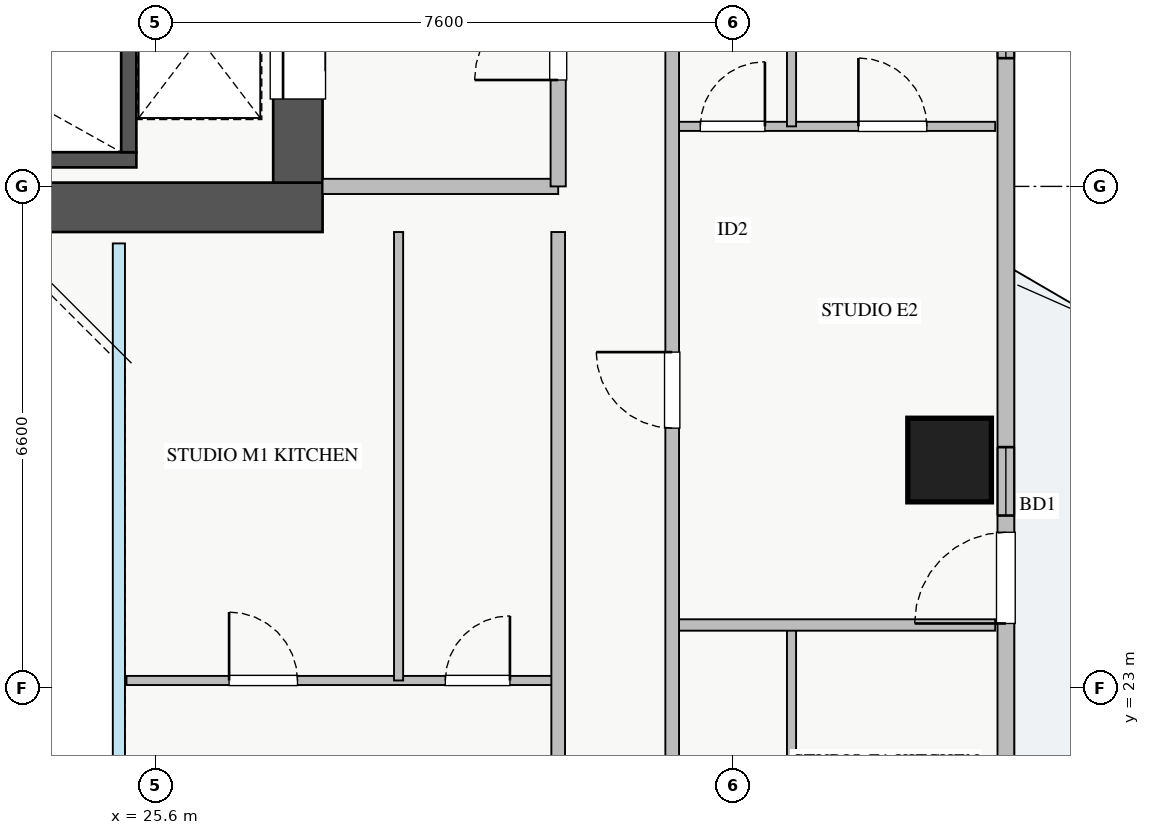
"""IFC4 building model, lengths in metres.
Left out: names, types, materials, properties, quantities, classifications, styles, units other than length and angle.
Written with IfcOpenShell. Run it as: python <this file> out.ifc"""

import sys

from ifc_helpers import new_model, si_unit, direction, frame, frame_2d, origin, origin_2d, place, context, subcontext, project, spatial, rectangle, extrude, source, transform, mapped, element, fill, save


model = new_model("IFC4")
c1 = context("Model", 3, precision=1e-05, world=origin(), true_north=direction((0.0, 1.0)))
c2 = subcontext(c1, "Body", "Model", "MODEL_VIEW")
j1 = project(units=[si_unit("LENGTHUNIT", "METRE"), si_unit("PLANEANGLEUNIT", "RADIAN")], contexts=[c1])
p1 = place(None, origin())
s1 = spatial("IfcSite", under=j1, at=p1, CompositionType="ELEMENT")
p2 = place(p1, origin())
s2 = spatial("IfcBuilding", under=s1, at=p2, CompositionType="ELEMENT")
p3 = place(p2, frame((0.0, 0.0, 132.75)))
s3 = spatial("IfcBuildingStorey", under=s2, at=p3, CompositionType="ELEMENT", Elevation=132.75)
p4 = place(p3, frame((18.2, 29.95, 0.0), z_axis=(0.0, 0.0, 1.0), x_axis=(1.0, 0.0, 0.0)))
e1 = element("IfcWall", 1, at=p4, inside=s3, PredefinedType="SHEAR", context=c2, shape_type="SweptSolid", body=[
    extrude(rectangle(XDim=7.15, YDim=0.2, at=frame_2d((3.575, 0.0))), origin(), (0.0, 0.0, 1.0), 3.25),
])
p5 = place(p3, frame((25.25, 30.05, 0.0), z_axis=(0.0, 0.0, 1.0), x_axis=(0.0, 1.0, 0.0)))
e2 = element("IfcWall", 2, at=p5, inside=s3, PredefinedType="SHEAR", context=c2, shape_type="SweptSolid", body=[
    extrude(rectangle(XDim=2.94, YDim=0.2, at=frame_2d((1.47, 0.0))), origin(), (0.0, 0.0, 1.0), 3.25),
])
p6 = place(p3, frame((10.2, 29.325, 0.0), z_axis=(0.0, 0.0, 1.0), x_axis=(1.0, 0.0, 0.0)))
e3 = element("IfcWall", 3, at=p6, inside=s3, PredefinedType="SHEAR", context=c2, shape_type="SweptSolid", body=[
    extrude(rectangle(XDim=17.6, YDim=0.65, at=frame_2d((8.8, 0.0))), origin(), (0.0, 0.0, 1.0), 3.25),
])
p7 = place(p3, frame((27.475, 29.65, 0.0), z_axis=(0.0, 0.0, 1.0), x_axis=(0.0, 1.0, 0.0)))
e4 = element("IfcWall", 4, at=p7, inside=s3, PredefinedType="SHEAR", context=c2, shape_type="SweptSolid", body=[
    extrude(rectangle(XDim=5.9, YDim=0.65, at=frame_2d((2.95, 0.0))), origin(), (0.0, 0.0, 1.0), 3.25),
])
p8 = place(p7, frame((1.1, 0.0, 0.0)))
e5 = element("IfcOpeningElement", 5, at=p8, cuts=e4, PredefinedType="OPENING", context=c2, shape_type="SweptSolid", body=[
    extrude(rectangle(XDim=1.3, YDim=2.05, at=frame_2d((0.65, 1.025))), frame((0.0, 0.335, 0.0), z_axis=(0.0, -1.0, 0.0), x_axis=(1.0, 0.0, 0.0)), (0.0, 0.0, 1.0), 0.67),
])
m1 = source(origin(), c2, "Body", "SweptSolid", [
    extrude(rectangle(XDim=1.1, YDim=1.1, at=origin_2d()), origin(), (0.0, 0.0, 1.0), 3.25),
])
p9 = place(p3, frame((36.05, 26.0, 0.0), z_axis=(0.0, 0.0, 1.0), x_axis=(1.0, 0.0, 0.0)))
e6 = element("IfcColumn", 6, at=p9, inside=s3, PredefinedType="COLUMN", context=c2, shape_type="MappedRepresentation", body=[
    mapped(m1, transform((0.0, 0.0, 0.0), x_axis=(1.0, 0.0, 0.0), y_axis=(0.0, 1.0, 0.0), z_axis=(0.0, 0.0, 1.0), scale=1.0)),
])
p10 = place(p3, frame((36.79, 10.55, 0.0), z_axis=(0.0, 0.0, 1.0), x_axis=(0.0, 1.0, 0.0)))
e7 = element("IfcWall", 7, at=p10, inside=s3, PredefinedType="STANDARD", context=c2, shape_type="SweptSolid", body=[
    extrude(rectangle(XDim=24.9, YDim=0.22, at=frame_2d((12.45, 0.0))), origin(), (0.0, 0.0, 1.0), 2.61),
])
p11 = place(p10, frame((13.3, 0.0, 0.0)))
e8 = element("IfcOpeningElement", 8, at=p11, cuts=e7, PredefinedType="OPENING", context=c2, shape_type="SweptSolid", body=[
    extrude(rectangle(XDim=1.2, YDim=2.1, at=frame_2d((0.6, 1.05))), frame((0.0, 0.12, 0.0), z_axis=(0.0, -1.0, 0.0), x_axis=(1.0, 0.0, 0.0)), (0.0, 0.0, 1.0), 0.24),
])
p12 = place(p10, frame((1.912, 0.0, 0.9)))
e9 = element("IfcOpeningElement", 9, at=p12, cuts=e7, PredefinedType="OPENING", context=c2, shape_type="SweptSolid", body=[
    extrude(rectangle(XDim=2.4, YDim=1.48, at=frame_2d((1.2, 0.74))), frame((0.0, 0.12, 0.0), z_axis=(0.0, -1.0, 0.0), x_axis=(1.0, 0.0, 0.0)), (0.0, 0.0, 1.0), 0.24),
])
p13 = place(p10, frame((20.737, 0.0, 0.9)))
e10 = element("IfcOpeningElement", 10, at=p13, cuts=e7, PredefinedType="OPENING", context=c2, shape_type="SweptSolid", body=[
    extrude(rectangle(XDim=2.1, YDim=1.48, at=frame_2d((1.05, 0.74))), frame((0.0, 0.12, 0.0), z_axis=(0.0, -1.0, 0.0), x_axis=(1.0, 0.0, 0.0)), (0.0, 0.0, 1.0), 0.24),
])
p14 = place(p10, frame((14.72, 0.0, 0.9)))
e11 = element("IfcOpeningElement", 11, at=p14, cuts=e7, PredefinedType="OPENING", context=c2, shape_type="SweptSolid", body=[
    extrude(rectangle(XDim=0.9, YDim=1.2, at=frame_2d((0.45, 0.6))), frame((0.0, 0.12, 0.0), z_axis=(0.0, -1.0, 0.0), x_axis=(1.0, 0.0, 0.0)), (0.0, 0.0, 1.0), 0.24),
])
p15 = place(p3, frame((27.8, 29.6, 0.0), z_axis=(0.0, 0.0, 1.0), x_axis=(1.0, 0.0, 0.0)))
e12 = element("IfcWall", 12, at=p15, inside=s3, PredefinedType="PARTITIONING", context=c2, shape_type="SweptSolid", body=[
    extrude(rectangle(XDim=3.1, YDim=0.2, at=frame_2d((1.55, 0.0))), origin(), (0.0, 0.0, 1.0), 3.07),
])
p16 = place(p3, frame((30.9, 29.6, 0.0), z_axis=(0.0, 0.0, 1.0), x_axis=(0.0, 1.0, 0.0)))
e13 = element("IfcWall", 13, at=p16, inside=s3, PredefinedType="PARTITIONING", context=c2, shape_type="SweptSolid", body=[
    extrude(rectangle(XDim=3.9, YDim=0.2, at=frame_2d((1.95, 0.0))), origin(), (0.0, 0.0, 1.0), 3.07),
])
p17 = place(p16, frame((1.4, 0.0, 0.0)))
e14 = element("IfcOpeningElement", 14, at=p17, cuts=e13, PredefinedType="OPENING", context=c2, shape_type="SweptSolid", body=[
    extrude(rectangle(XDim=1.1, YDim=2.05, at=frame_2d((0.55, 1.025))), frame((0.0, 0.11, 0.0), z_axis=(0.0, -1.0, 0.0), x_axis=(1.0, 0.0, 0.0)), (0.0, 0.0, 1.0), 0.22),
])
p18 = place(p3, frame((33.97, 17.48, 0.0), z_axis=(0.0, 0.0, 1.0), x_axis=(0.0, 1.0, 0.0)))
e15 = element("IfcWall", 15, at=p18, inside=s3, PredefinedType="PLUMBINGWALL", context=c2, shape_type="SweptSolid", body=[
    extrude(rectangle(XDim=6.35, YDim=0.12, at=frame_2d((3.175, 0.0))), origin(), (0.0, 0.0, 1.0), 3.07),
])
p19 = place(p3, frame((32.4, 30.39, 0.0), z_axis=(0.0, 0.0, 1.0), x_axis=(1.0, 0.0, 0.0)))
e16 = element("IfcWall", 16, at=p19, inside=s3, PredefinedType="PLUMBINGWALL", context=c2, shape_type="SweptSolid", body=[
    extrude(rectangle(XDim=4.25, YDim=0.12, at=frame_2d((2.125, 0.0))), origin(), (0.0, 0.0, 1.0), 3.07),
])
p20 = place(p19, frame((0.37, 0.0, 0.0)))
e17 = element("IfcOpeningElement", 17, at=p20, cuts=e16, PredefinedType="OPENING", context=c2, shape_type="SweptSolid", body=[
    extrude(rectangle(XDim=0.85, YDim=2.05, at=frame_2d((0.425, 1.025))), frame((0.0, 0.07, 0.0), z_axis=(0.0, -1.0, 0.0), x_axis=(1.0, 0.0, 0.0)), (0.0, 0.0, 1.0), 0.14),
])
p21 = place(p19, frame((2.45, 0.0, 0.0)))
e18 = element("IfcOpeningElement", 18, at=p21, cuts=e16, PredefinedType="OPENING", context=c2, shape_type="SweptSolid", body=[
    extrude(rectangle(XDim=0.9, YDim=2.05, at=frame_2d((0.45, 1.025))), frame((0.0, 0.07, 0.0), z_axis=(0.0, -1.0, 0.0), x_axis=(1.0, 0.0, 0.0)), (0.0, 0.0, 1.0), 0.14),
])
p22 = place(p3, frame((33.97, 30.39, 0.0), z_axis=(0.0, 0.0, 1.0), x_axis=(0.0, 1.0, 0.0)))
e19 = element("IfcWall", 19, at=p22, inside=s3, PredefinedType="PLUMBINGWALL", context=c2, shape_type="SweptSolid", body=[
    extrude(rectangle(XDim=5.59, YDim=0.12, at=frame_2d((2.795, 0.0))), origin(), (0.0, 0.0, 1.0), 3.07),
])
p23 = place(p3, frame((32.4, 23.83, 0.0), z_axis=(0.0, 0.0, 1.0), x_axis=(1.0, 0.0, 0.0)))
e20 = element("IfcWall", 20, at=p23, inside=s3, PredefinedType="PARTITIONING", context=c2, shape_type="SweptSolid", body=[
    extrude(rectangle(XDim=4.25, YDim=0.15, at=frame_2d((2.125, 0.0))), origin(), (0.0, 0.0, 1.0), 3.07),
])
p24 = place(p3, frame((32.4, 8.31, 0.0), z_axis=(0.0, 0.0, 1.0), x_axis=(0.0, 1.0, 0.0)))
e21 = element("IfcWall", 21, at=p24, inside=s3, PredefinedType="PARTITIONING", context=c2, shape_type="SweptSolid", body=[
    extrude(rectangle(XDim=29.13, YDim=0.18, at=frame_2d((14.565, 0.0))), origin(), (0.0, 0.0, 1.0), 3.07),
])
p25 = place(p24, frame((27.94, 0.0, 0.0)))
e22 = element("IfcOpeningElement", 22, at=p25, cuts=e21, PredefinedType="OPENING", context=c2, shape_type="SweptSolid", body=[
    extrude(rectangle(XDim=0.9, YDim=2.05, at=frame_2d((0.45, 1.025))), frame((0.0, 0.1, 0.0), z_axis=(0.0, -1.0, 0.0), x_axis=(1.0, 0.0, 0.0)), (0.0, 0.0, 1.0), 0.2),
])
p26 = place(p24, frame((0.415, 0.0, 0.0)))
e23 = element("IfcOpeningElement", 23, at=p26, cuts=e21, PredefinedType="OPENING", context=c2, shape_type="SweptSolid", body=[
    extrude(rectangle(XDim=0.9, YDim=2.05, at=frame_2d((0.45, 1.025))), frame((0.0, 0.1, 0.0), z_axis=(0.0, -1.0, 0.0), x_axis=(1.0, 0.0, 0.0)), (0.0, 0.0, 1.0), 0.2),
])
p27 = place(p24, frame((4.75, 0.0, 0.0)))
e24 = element("IfcOpeningElement", 24, at=p27, cuts=e21, PredefinedType="OPENING", context=c2, shape_type="SweptSolid", body=[
    extrude(rectangle(XDim=1.0, YDim=2.05, at=frame_2d((0.5, 1.025))), frame((0.0, 0.1, 0.0), z_axis=(0.0, -1.0, 0.0), x_axis=(1.0, 0.0, 0.0)), (0.0, 0.0, 1.0), 0.2),
])
p28 = place(p24, frame((18.11, 0.0, 0.0)))
e25 = element("IfcOpeningElement", 25, at=p28, cuts=e21, PredefinedType="OPENING", context=c2, shape_type="SweptSolid", body=[
    extrude(rectangle(XDim=1.0, YDim=2.05, at=frame_2d((0.5, 1.025))), frame((0.0, 0.1, 0.0), z_axis=(0.0, -1.0, 0.0), x_axis=(1.0, 0.0, 0.0)), (0.0, 0.0, 1.0), 0.2),
])
p29 = place(p3, frame((25.22, 23.1, 0.0), z_axis=(0.0, 0.0, 1.0), x_axis=(1.0, 0.0, 0.0)))
e26 = element("IfcWall", 26, at=p29, inside=s3, PredefinedType="PLUMBINGWALL", context=c2, shape_type="SweptSolid", body=[
    extrude(rectangle(XDim=5.68, YDim=0.12, at=frame_2d((2.84, 0.0))), origin(), (0.0, 0.0, 1.0), 3.07),
])
p30 = place(p29, frame((1.35, 0.0, 0.0)))
e27 = element("IfcOpeningElement", 27, at=p30, cuts=e26, PredefinedType="OPENING", context=c2, shape_type="SweptSolid", body=[
    extrude(rectangle(XDim=0.9, YDim=2.05, at=frame_2d((0.45, 1.025))), frame((0.0, 0.07, 0.0), z_axis=(0.0, -1.0, 0.0), x_axis=(1.0, 0.0, 0.0)), (0.0, 0.0, 1.0), 0.14),
])
p31 = place(p29, frame((4.195, 0.0, 0.0)))
e28 = element("IfcOpeningElement", 28, at=p31, cuts=e26, PredefinedType="OPENING", context=c2, shape_type="SweptSolid", body=[
    extrude(rectangle(XDim=0.85, YDim=2.05, at=frame_2d((0.425, 1.025))), frame((0.0, 0.07, 0.0), z_axis=(0.0, -1.0, 0.0), x_axis=(1.0, 0.0, 0.0)), (0.0, 0.0, 1.0), 0.14),
])
p32 = place(p3, frame((28.8, 23.1, 0.0), z_axis=(0.0, 0.0, 1.0), x_axis=(0.0, 1.0, 0.0)))
e29 = element("IfcWall", 29, at=p32, inside=s3, PredefinedType="PLUMBINGWALL", context=c2, shape_type="SweptSolid", body=[
    extrude(rectangle(XDim=5.9, YDim=0.12, at=frame_2d((2.95, 0.0))), origin(), (0.0, 0.0, 1.0), 3.07),
])
p33 = place(p3, frame((30.9, 17.0, 0.0), z_axis=(0.0, 0.0, 1.0), x_axis=(0.0, 1.0, 0.0)))
e30 = element("IfcWall", 30, at=p33, inside=s3, PredefinedType="PARTITIONING", context=c2, shape_type="SweptSolid", body=[
    extrude(rectangle(XDim=12.0, YDim=0.18, at=frame_2d((6.0, 0.0))), origin(), (0.0, 0.0, 1.0), 3.07),
])
p34 = place(p33, frame((2.36, 0.0, 0.0)))
e31 = element("IfcOpeningElement", 31, at=p34, cuts=e30, PredefinedType="OPENING", context=c2, shape_type="SweptSolid", body=[
    extrude(rectangle(XDim=1.0, YDim=2.05, at=frame_2d((0.5, 1.025))), frame((0.0, 0.1, 0.0), z_axis=(0.0, -1.0, 0.0), x_axis=(1.0, 0.0, 0.0)), (0.0, 0.0, 1.0), 0.2),
])
m2 = source(origin(), c2, "Body", "SweptSolid", [
    extrude(rectangle(XDim=1.2, YDim=2.1, at=frame_2d((0.6, 1.05))), frame((0.0, 0.025, 0.0), z_axis=(0.0, -1.0, 0.0), x_axis=(1.0, 0.0, 0.0)), (0.0, 0.0, 1.0), 0.05),
])
p35 = place(p11, origin())
e32 = element("IfcDoor", 32, at=p35, inside=s3, OperationType="SINGLE_SWING_LEFT", PredefinedType="DOOR", context=c2, shape_type="MappedRepresentation", body=[
    mapped(m2, transform((0.0, 0.0, 0.0), x_axis=(1.0, 0.0, 0.0), y_axis=(0.0, 1.0, 0.0), z_axis=(0.0, 0.0, 1.0), scale=1.0)),
])
fill(e8, e32)
m3 = source(origin(), c2, "Body", "SweptSolid", [
    extrude(rectangle(XDim=2.1, YDim=1.48, at=frame_2d((1.05, 0.74))), frame((0.0, 0.03, 0.0), z_axis=(0.0, -1.0, 0.0), x_axis=(1.0, 0.0, 0.0)), (0.0, 0.0, 1.0), 0.06),
])
p36 = place(p13, origin())
e33 = element("IfcWindow", 33, at=p36, inside=s3, PartitioningType="TRIPLE_PANEL_VERTICAL", PredefinedType="WINDOW", context=c2, shape_type="MappedRepresentation", body=[
    mapped(m3, transform((0.0, 0.0, 0.0), x_axis=(1.0, 0.0, 0.0), y_axis=(0.0, 1.0, 0.0), z_axis=(0.0, 0.0, 1.0), scale=1.0)),
])
fill(e10, e33)
m4 = source(origin(), c2, "Body", "SweptSolid", [
    extrude(rectangle(XDim=1.3, YDim=2.05, at=frame_2d((0.65, 1.025))), frame((0.0, 0.025, 0.0), z_axis=(0.0, -1.0, 0.0), x_axis=(1.0, 0.0, 0.0)), (0.0, 0.0, 1.0), 0.05),
])
p37 = place(p8, origin())
e34 = element("IfcDoor", 34, at=p37, inside=s3, OperationType="SLIDING_TO_LEFT", PredefinedType="DOOR", context=c2, shape_type="MappedRepresentation", body=[
    mapped(m4, transform((0.0, 0.0, 0.0), x_axis=(1.0, 0.0, 0.0), y_axis=(0.0, 1.0, 0.0), z_axis=(0.0, 0.0, 1.0), scale=1.0)),
])
fill(e5, e34)
m5 = source(origin(), c2, "Body", "SweptSolid", [
    extrude(rectangle(XDim=1.1, YDim=2.05, at=frame_2d((0.55, 1.025))), frame((0.0, 0.025, 0.0), z_axis=(0.0, -1.0, 0.0), x_axis=(1.0, 0.0, 0.0)), (0.0, 0.0, 1.0), 0.05),
])
p38 = place(p17, origin())
e35 = element("IfcDoor", 35, at=p38, inside=s3, OperationType="SINGLE_SWING_LEFT", PredefinedType="DOOR", context=c2, shape_type="MappedRepresentation", body=[
    mapped(m5, transform((0.0, 0.0, 0.0), x_axis=(1.0, 0.0, 0.0), y_axis=(0.0, 1.0, 0.0), z_axis=(0.0, 0.0, 1.0), scale=1.0)),
])
fill(e14, e35)
m6 = source(origin(), c2, "Body", "SweptSolid", [
    extrude(rectangle(XDim=0.85, YDim=2.05, at=frame_2d((0.425, 1.025))), frame((0.0, 0.025, 0.0), z_axis=(0.0, -1.0, 0.0), x_axis=(1.0, 0.0, 0.0)), (0.0, 0.0, 1.0), 0.05),
])
p39 = place(p20, origin())
e36 = element("IfcDoor", 36, at=p39, inside=s3, OperationType="SINGLE_SWING_RIGHT", PredefinedType="DOOR", context=c2, shape_type="MappedRepresentation", body=[
    mapped(m6, transform((0.0, 0.0, 0.0), x_axis=(1.0, 0.0, 0.0), y_axis=(0.0, 1.0, 0.0), z_axis=(0.0, 0.0, 1.0), scale=1.0)),
])
fill(e17, e36)
m7 = source(origin(), c2, "Body", "SweptSolid", [
    extrude(rectangle(XDim=0.9, YDim=2.05, at=frame_2d((0.45, 1.025))), frame((0.0, 0.025, 0.0), z_axis=(0.0, -1.0, 0.0), x_axis=(1.0, 0.0, 0.0)), (0.0, 0.0, 1.0), 0.05),
])
p40 = place(p21, origin())
e37 = element("IfcDoor", 37, at=p40, inside=s3, OperationType="SINGLE_SWING_LEFT", PredefinedType="DOOR", context=c2, shape_type="MappedRepresentation", body=[
    mapped(m7, transform((0.0, 0.0, 0.0), x_axis=(1.0, 0.0, 0.0), y_axis=(0.0, 1.0, 0.0), z_axis=(0.0, 0.0, 1.0), scale=1.0)),
])
fill(e18, e37)
m8 = source(origin(), c2, "Body", "SweptSolid", [
    extrude(rectangle(XDim=1.0, YDim=2.05, at=frame_2d((0.5, 1.025))), frame((0.0, 0.025, 0.0), z_axis=(0.0, -1.0, 0.0), x_axis=(1.0, 0.0, 0.0)), (0.0, 0.0, 1.0), 0.05),
])
p41 = place(p28, origin())
e38 = element("IfcDoor", 38, at=p41, inside=s3, OperationType="SINGLE_SWING_RIGHT", PredefinedType="DOOR", context=c2, shape_type="MappedRepresentation", body=[
    mapped(m8, transform((0.0, 0.0, 0.0), x_axis=(1.0, 0.0, 0.0), y_axis=(0.0, 1.0, 0.0), z_axis=(0.0, 0.0, 1.0), scale=1.0)),
])
fill(e25, e38)
p42 = place(p30, origin())
e39 = element("IfcDoor", 39, at=p42, inside=s3, OperationType="SINGLE_SWING_LEFT", PredefinedType="DOOR", context=c2, shape_type="MappedRepresentation", body=[
    mapped(m7, transform((0.0, 0.0, 0.0), x_axis=(1.0, 0.0, 0.0), y_axis=(0.0, 1.0, 0.0), z_axis=(0.0, 0.0, 1.0), scale=1.0)),
])
fill(e27, e39)
p43 = place(p31, origin())
e40 = element("IfcDoor", 40, at=p43, inside=s3, OperationType="SINGLE_SWING_RIGHT", PredefinedType="DOOR", context=c2, shape_type="MappedRepresentation", body=[
    mapped(m6, transform((0.0, 0.0, 0.0), x_axis=(1.0, 0.0, 0.0), y_axis=(0.0, 1.0, 0.0), z_axis=(0.0, 0.0, 1.0), scale=1.0)),
])
fill(e28, e40)
m9 = source(origin(), c2, "Body", "SweptSolid", [
    extrude(rectangle(XDim=0.9, YDim=1.2, at=frame_2d((0.45, 0.6))), frame((0.0, 0.03, 0.0), z_axis=(0.0, -1.0, 0.0), x_axis=(1.0, 0.0, 0.0)), (0.0, 0.0, 1.0), 0.06),
])
p44 = place(p14, origin())
e41 = element("IfcWindow", 41, at=p44, inside=s3, PartitioningType="SINGLE_PANEL", PredefinedType="WINDOW", context=c2, shape_type="MappedRepresentation", body=[
    mapped(m9, transform((0.0, 0.0, 0.0), x_axis=(1.0, 0.0, 0.0), y_axis=(0.0, 1.0, 0.0), z_axis=(0.0, 0.0, 1.0), scale=1.0)),
])
fill(e11, e41)
save(model, sys.argv[1])
